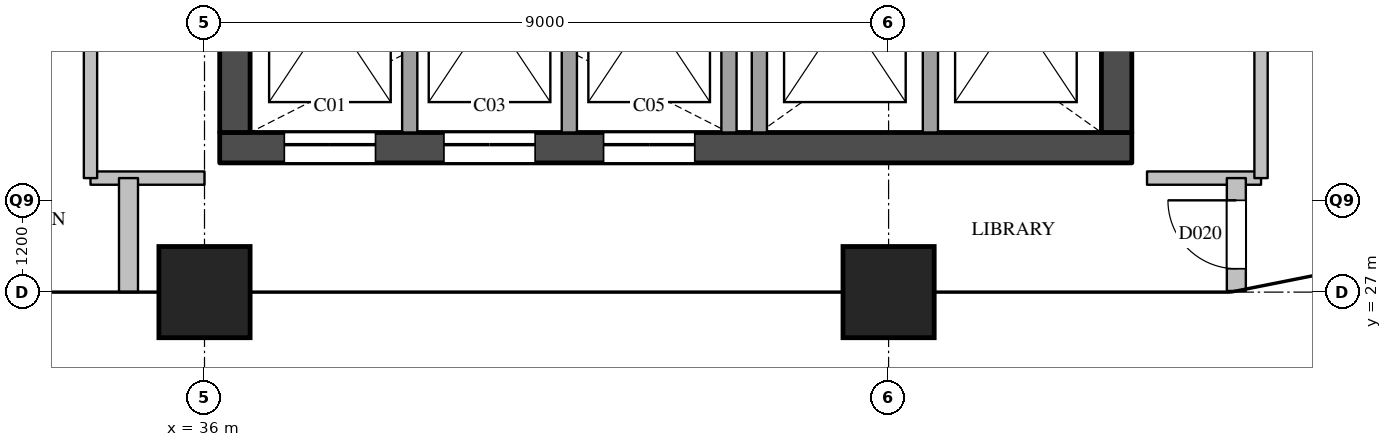
"""IFC4 building model, lengths in metres.
Left out: names, types, materials, properties, quantities, classifications, styles, units other than length and angle.
Written with IfcOpenShell. Run it as: python <this file> out.ifc"""

import sys

from ifc_helpers import new_model, si_unit, direction, frame, frame_2d, origin, origin_2d, place, context, subcontext, project, spatial, rectangle, extrude, element, fill, save


model = new_model("IFC4")
c1 = context("Model", 3, precision=1e-05, world=origin(), true_north=direction((0.0, 1.0)))
c2 = subcontext(c1, "Body", "Model", "MODEL_VIEW")
j1 = project(units=[si_unit("LENGTHUNIT", "METRE"), si_unit("PLANEANGLEUNIT", "RADIAN")], contexts=[c1])
p1 = place(None, origin())
s1 = spatial("IfcSite", under=j1, at=p1, CompositionType="ELEMENT")
p2 = place(p1, origin())
s2 = spatial("IfcBuilding", under=s1, at=p2, CompositionType="ELEMENT")
p3 = place(p2, frame((0.0, 0.0, 254.0)))
s3 = spatial("IfcBuildingStorey", under=s2, at=p3, CompositionType="ELEMENT", Elevation=254.0)
for number, where, z_axis, x_axis in (
    (1, (36.0, 27.0, 0.0), (0.0, 0.0, 1.0), (1.0, 0.0, 0.0)),
    (2, (45.0, 27.0, 0.0), (0.0, 0.0, 1.0), (1.0, 0.0, 0.0)),
):
    element("IfcColumn", number, at=place(p3, frame(where, z_axis=z_axis, x_axis=x_axis)), inside=s3, PredefinedType="COLUMN", context=c2, shape_type="SweptSolid", body=[
        extrude(rectangle(XDim=1.2, YDim=1.2, at=origin_2d()), origin(), (0.0, 0.0, 1.0), 3.9),
    ])
p4 = place(p3, frame((36.2, 28.9, 0.0), z_axis=(0.0, 0.0, 1.0), x_axis=(1.0, 0.0, 0.0)))
e3 = element("IfcWall", 3, at=p4, inside=s3, PredefinedType="SHEAR", context=c2, shape_type="SweptSolid", body=[
    extrude(rectangle(XDim=12.0, YDim=0.4, at=frame_2d((6.0, 0.0))), origin(), (0.0, 0.0, 1.0), 3.6),
])
p5 = place(p4, frame((0.85, 0.0, 0.0)))
e4 = element("IfcOpeningElement", 4, at=p5, cuts=e3, PredefinedType="OPENING", context=c2, shape_type="SweptSolid", body=[
    extrude(rectangle(XDim=1.2, YDim=2.1, at=frame_2d((0.6, 1.05))), frame((0.0, 0.21, 0.0), z_axis=(0.0, -1.0, 0.0), x_axis=(1.0, 0.0, 0.0)), (0.0, 0.0, 1.0), 0.42),
])
p6 = place(p4, frame((2.95, 0.0, 0.0)))
e5 = element("IfcOpeningElement", 5, at=p6, cuts=e3, PredefinedType="OPENING", context=c2, shape_type="SweptSolid", body=[
    extrude(rectangle(XDim=1.2, YDim=2.1, at=frame_2d((0.6, 1.05))), frame((0.0, 0.21, 0.0), z_axis=(0.0, -1.0, 0.0), x_axis=(1.0, 0.0, 0.0)), (0.0, 0.0, 1.0), 0.42),
])
p7 = place(p4, frame((5.05, 0.0, 0.0)))
e6 = element("IfcOpeningElement", 6, at=p7, cuts=e3, PredefinedType="OPENING", context=c2, shape_type="SweptSolid", body=[
    extrude(rectangle(XDim=1.2, YDim=2.1, at=frame_2d((0.6, 1.05))), frame((0.0, 0.21, 0.0), z_axis=(0.0, -1.0, 0.0), x_axis=(1.0, 0.0, 0.0)), (0.0, 0.0, 1.0), 0.42),
])
p8 = place(p3, frame((36.4, 29.1, 0.0), z_axis=(0.0, 0.0, 1.0), x_axis=(0.0, 1.0, 0.0)))
e7 = element("IfcWall", 7, at=p8, inside=s3, PredefinedType="SHEAR", context=c2, shape_type="SweptSolid", body=[
    extrude(rectangle(XDim=20.3, YDim=0.4, at=frame_2d((10.15, 0.0))), origin(), (0.0, 0.0, 1.0), 3.6),
])
p9 = place(p8, frame((3.6, 0.0, 0.0)))
e8 = element("IfcOpeningElement", 8, at=p9, cuts=e7, PredefinedType="OPENING", context=c2, shape_type="SweptSolid", body=[
    extrude(rectangle(XDim=1.8, YDim=2.1, at=frame_2d((0.9, 1.05))), frame((0.0, 0.21, 0.0), z_axis=(0.0, -1.0, 0.0), x_axis=(1.0, 0.0, 0.0)), (0.0, 0.0, 1.0), 0.42),
])
p10 = place(p8, frame((16.4, 0.0, 0.0)))
e9 = element("IfcOpeningElement", 9, at=p10, cuts=e7, PredefinedType="OPENING", context=c2, shape_type="SweptSolid", body=[
    extrude(rectangle(XDim=1.0, YDim=2.1, at=frame_2d((0.5, 1.05))), frame((0.0, 0.21, 0.0), z_axis=(0.0, -1.0, 0.0), x_axis=(1.0, 0.0, 0.0)), (0.0, 0.0, 1.0), 0.42),
])
p11 = place(p3, frame((48.0, 29.1, 0.0), z_axis=(0.0, 0.0, 1.0), x_axis=(0.0, 1.0, 0.0)))
e10 = element("IfcWall", 10, at=p11, inside=s3, PredefinedType="SHEAR", context=c2, shape_type="SweptSolid", body=[
    extrude(rectangle(XDim=20.3, YDim=0.4, at=frame_2d((10.15, 0.0))), origin(), (0.0, 0.0, 1.0), 3.6),
])
p12 = place(p11, frame((12.5, 0.0, 0.0)))
e11 = element("IfcOpeningElement", 11, at=p12, cuts=e10, PredefinedType="OPENING", context=c2, shape_type="SweptSolid", body=[
    extrude(rectangle(XDim=0.7, YDim=2.1, at=frame_2d((0.35, 1.05))), frame((0.0, 0.21, 0.0), z_axis=(0.0, -1.0, 0.0), x_axis=(1.0, 0.0, 0.0)), (0.0, 0.0, 1.0), 0.42),
])
p13 = place(p11, frame((3.9, 0.0, 0.0)))
e12 = element("IfcOpeningElement", 12, at=p13, cuts=e10, PredefinedType="OPENING", context=c2, shape_type="SweptSolid", body=[
    extrude(rectangle(XDim=1.8, YDim=2.1, at=frame_2d((0.9, 1.05))), frame((0.0, 0.21, 0.0), z_axis=(0.0, -1.0, 0.0), x_axis=(1.0, 0.0, 0.0)), (0.0, 0.0, 1.0), 0.42),
])
for number, where, z_axis, x_axis in (
    (13, (38.7, 29.1, 0.0), (0.0, 0.0, 1.0), (0.0, 1.0, 0.0)),
    (14, (40.8, 29.1, 0.0), (0.0, 0.0, 1.0), (0.0, 1.0, 0.0)),
    (15, (42.9, 29.1, 0.0), (0.0, 0.0, 1.0), (0.0, 1.0, 0.0)),
):
    element("IfcWall", number, at=place(p3, frame(where, z_axis=z_axis, x_axis=x_axis)), inside=s3, PredefinedType="SOLIDWALL", context=c2, shape_type="SweptSolid", body=[
        extrude(rectangle(XDim=3.2, YDim=0.2, at=frame_2d((1.6, 0.0))), origin(), (0.0, 0.0, 1.0), 3.6),
    ])
p14 = place(p3, frame((43.3, 29.1, 0.0), z_axis=(0.0, 0.0, 1.0), x_axis=(0.0, 1.0, 0.0)))
e16 = element("IfcWall", 16, at=p14, inside=s3, PredefinedType="SOLIDWALL", context=c2, shape_type="SweptSolid", body=[
    extrude(rectangle(XDim=9.9, YDim=0.2, at=frame_2d((4.95, 0.0))), origin(), (0.0, 0.0, 1.0), 3.6),
])
p15 = place(p3, frame((45.55, 29.1, 0.0), z_axis=(0.0, 0.0, 1.0), x_axis=(0.0, 1.0, 0.0)))
e17 = element("IfcWall", 17, at=p15, inside=s3, PredefinedType="SOLIDWALL", context=c2, shape_type="SweptSolid", body=[
    extrude(rectangle(XDim=3.2, YDim=0.2, at=frame_2d((1.6, 0.0))), origin(), (0.0, 0.0, 1.0), 3.6),
])
for number, where, z_axis, x_axis in (
    (18, (34.5, 28.5, 0.0), (0.0, 0.0, 1.0), (1.0, 0.0, 0.0)),
    (19, (48.4, 28.5, 0.0), (0.0, 0.0, 1.0), (1.0, 0.0, 0.0)),
):
    element("IfcWall", number, at=place(p3, frame(where, z_axis=z_axis, x_axis=x_axis)), inside=s3, PredefinedType="PARTITIONING", context=c2, shape_type="SweptSolid", body=[
        extrude(rectangle(XDim=1.5, YDim=0.175, at=frame_2d((0.75, 0.0))), origin(), (0.0, 0.0, 1.0), 3.6),
    ])
p16 = place(p3, frame((34.5, 28.5, 0.0), z_axis=(0.0, 0.0, 1.0), x_axis=(0.0, 1.0, 0.0)))
e20 = element("IfcWall", 20, at=p16, inside=s3, PredefinedType="PARTITIONING", context=c2, shape_type="SweptSolid", body=[
    extrude(rectangle(XDim=15.7, YDim=0.175, at=frame_2d((7.85, 0.0))), origin(), (0.0, 0.0, 1.0), 3.6),
])
p17 = place(p16, frame((10.1, 0.0, 0.0)))
e21 = element("IfcOpeningElement", 21, at=p17, cuts=e20, PredefinedType="OPENING", context=c2, shape_type="SweptSolid", body=[
    extrude(rectangle(XDim=1.0, YDim=2.1, at=frame_2d((0.5, 1.05))), frame((0.0, 0.097, 0.0), z_axis=(0.0, -1.0, 0.0), x_axis=(1.0, 0.0, 0.0)), (0.0, 0.0, 1.0), 0.195),
])
p18 = place(p16, frame((11.9, 0.0, 0.0)))
e22 = element("IfcOpeningElement", 22, at=p18, cuts=e20, PredefinedType="OPENING", context=c2, shape_type="SweptSolid", body=[
    extrude(rectangle(XDim=1.0, YDim=2.1, at=frame_2d((0.5, 1.05))), frame((0.0, 0.097, 0.0), z_axis=(0.0, -1.0, 0.0), x_axis=(1.0, 0.0, 0.0)), (0.0, 0.0, 1.0), 0.195),
])
p19 = place(p3, frame((49.9, 28.5, 0.0), z_axis=(0.0, 0.0, 1.0), x_axis=(0.0, 1.0, 0.0)))
e23 = element("IfcWall", 23, at=p19, inside=s3, PredefinedType="PARTITIONING", context=c2, shape_type="SweptSolid", body=[
    extrude(rectangle(XDim=23.0, YDim=0.175, at=frame_2d((11.5, 0.0))), origin(), (0.0, 0.0, 1.0), 3.6),
])
p20 = place(p19, frame((7.8, 0.0, 0.0)))
e24 = element("IfcOpeningElement", 24, at=p20, cuts=e23, PredefinedType="OPENING", context=c2, shape_type="SweptSolid", body=[
    extrude(rectangle(XDim=0.9, YDim=2.1, at=frame_2d((0.45, 1.05))), frame((0.0, 0.097, 0.0), z_axis=(0.0, -1.0, 0.0), x_axis=(1.0, 0.0, 0.0)), (0.0, 0.0, 1.0), 0.195),
])
p21 = place(p19, frame((19.3, 0.0, 0.0)))
e25 = element("IfcOpeningElement", 25, at=p21, cuts=e23, PredefinedType="OPENING", context=c2, shape_type="SweptSolid", body=[
    extrude(rectangle(XDim=0.9, YDim=2.1, at=frame_2d((0.45, 1.05))), frame((0.0, 0.097, 0.0), z_axis=(0.0, -1.0, 0.0), x_axis=(1.0, 0.0, 0.0)), (0.0, 0.0, 1.0), 0.195),
])
p22 = place(p3, frame((35.0, 27.0, 0.0), z_axis=(0.0, 0.0, 1.0), x_axis=(0.0, 1.0, 0.0)))
e26 = element("IfcWall", 26, at=p22, inside=s3, PredefinedType="PARTITIONING", context=c2, shape_type="SweptSolid", body=[
    extrude(rectangle(XDim=1.5, YDim=0.25, at=frame_2d((0.75, 0.0))), origin(), (0.0, 0.0, 1.0), 2.6),
])
p23 = place(p3, frame((49.575, 27.015, 0.0), z_axis=(0.0, 0.0, 1.0), x_axis=(0.0, 1.0, 0.0)))
e27 = element("IfcWall", 27, at=p23, inside=s3, PredefinedType="PARTITIONING", context=c2, shape_type="SweptSolid", body=[
    extrude(rectangle(XDim=1.485, YDim=0.25, at=frame_2d((0.743, 0.0))), origin(), (0.0, 0.0, 1.0), 2.6),
])
p24 = place(p23, frame((0.292, 0.0, 0.0)))
e28 = element("IfcOpeningElement", 28, at=p24, cuts=e27, PredefinedType="OPENING", context=c2, shape_type="SweptSolid", body=[
    extrude(rectangle(XDim=0.9, YDim=2.1, at=frame_2d((0.45, 1.05))), frame((0.0, 0.135, 0.0), z_axis=(0.0, -1.0, 0.0), x_axis=(1.0, 0.0, 0.0)), (0.0, 0.0, 1.0), 0.27),
])
p25 = place(p5, origin())
e29 = element("IfcDoor", 29, at=p25, inside=s3, OperationType="SLIDING_TO_LEFT", PredefinedType="DOOR", context=c2, shape_type="SweptSolid", body=[
    extrude(rectangle(XDim=1.2, YDim=2.1, at=frame_2d((0.6, 1.05))), frame((0.0, 0.025, 0.0), z_axis=(0.0, -1.0, 0.0), x_axis=(1.0, 0.0, 0.0)), (0.0, 0.0, 1.0), 0.05),
])
fill(e4, e29)
p26 = place(p6, origin())
e30 = element("IfcDoor", 30, at=p26, inside=s3, OperationType="SLIDING_TO_LEFT", PredefinedType="DOOR", context=c2, shape_type="SweptSolid", body=[
    extrude(rectangle(XDim=1.2, YDim=2.1, at=frame_2d((0.6, 1.05))), frame((0.0, 0.025, 0.0), z_axis=(0.0, -1.0, 0.0), x_axis=(1.0, 0.0, 0.0)), (0.0, 0.0, 1.0), 0.05),
])
fill(e5, e30)
p27 = place(p7, origin())
e31 = element("IfcDoor", 31, at=p27, inside=s3, OperationType="SLIDING_TO_LEFT", PredefinedType="DOOR", context=c2, shape_type="SweptSolid", body=[
    extrude(rectangle(XDim=1.2, YDim=2.1, at=frame_2d((0.6, 1.05))), frame((0.0, 0.025, 0.0), z_axis=(0.0, -1.0, 0.0), x_axis=(1.0, 0.0, 0.0)), (0.0, 0.0, 1.0), 0.05),
])
fill(e6, e31)
p28 = place(p24, origin())
e32 = element("IfcDoor", 32, at=p28, inside=s3, OperationType="SINGLE_SWING_RIGHT", PredefinedType="DOOR", context=c2, shape_type="SweptSolid", body=[
    extrude(rectangle(XDim=0.9, YDim=2.1, at=frame_2d((0.45, 1.05))), frame((0.0, 0.025, 0.0), z_axis=(0.0, -1.0, 0.0), x_axis=(1.0, 0.0, 0.0)), (0.0, 0.0, 1.0), 0.05),
])
fill(e28, e32)
save(model, sys.argv[1])
